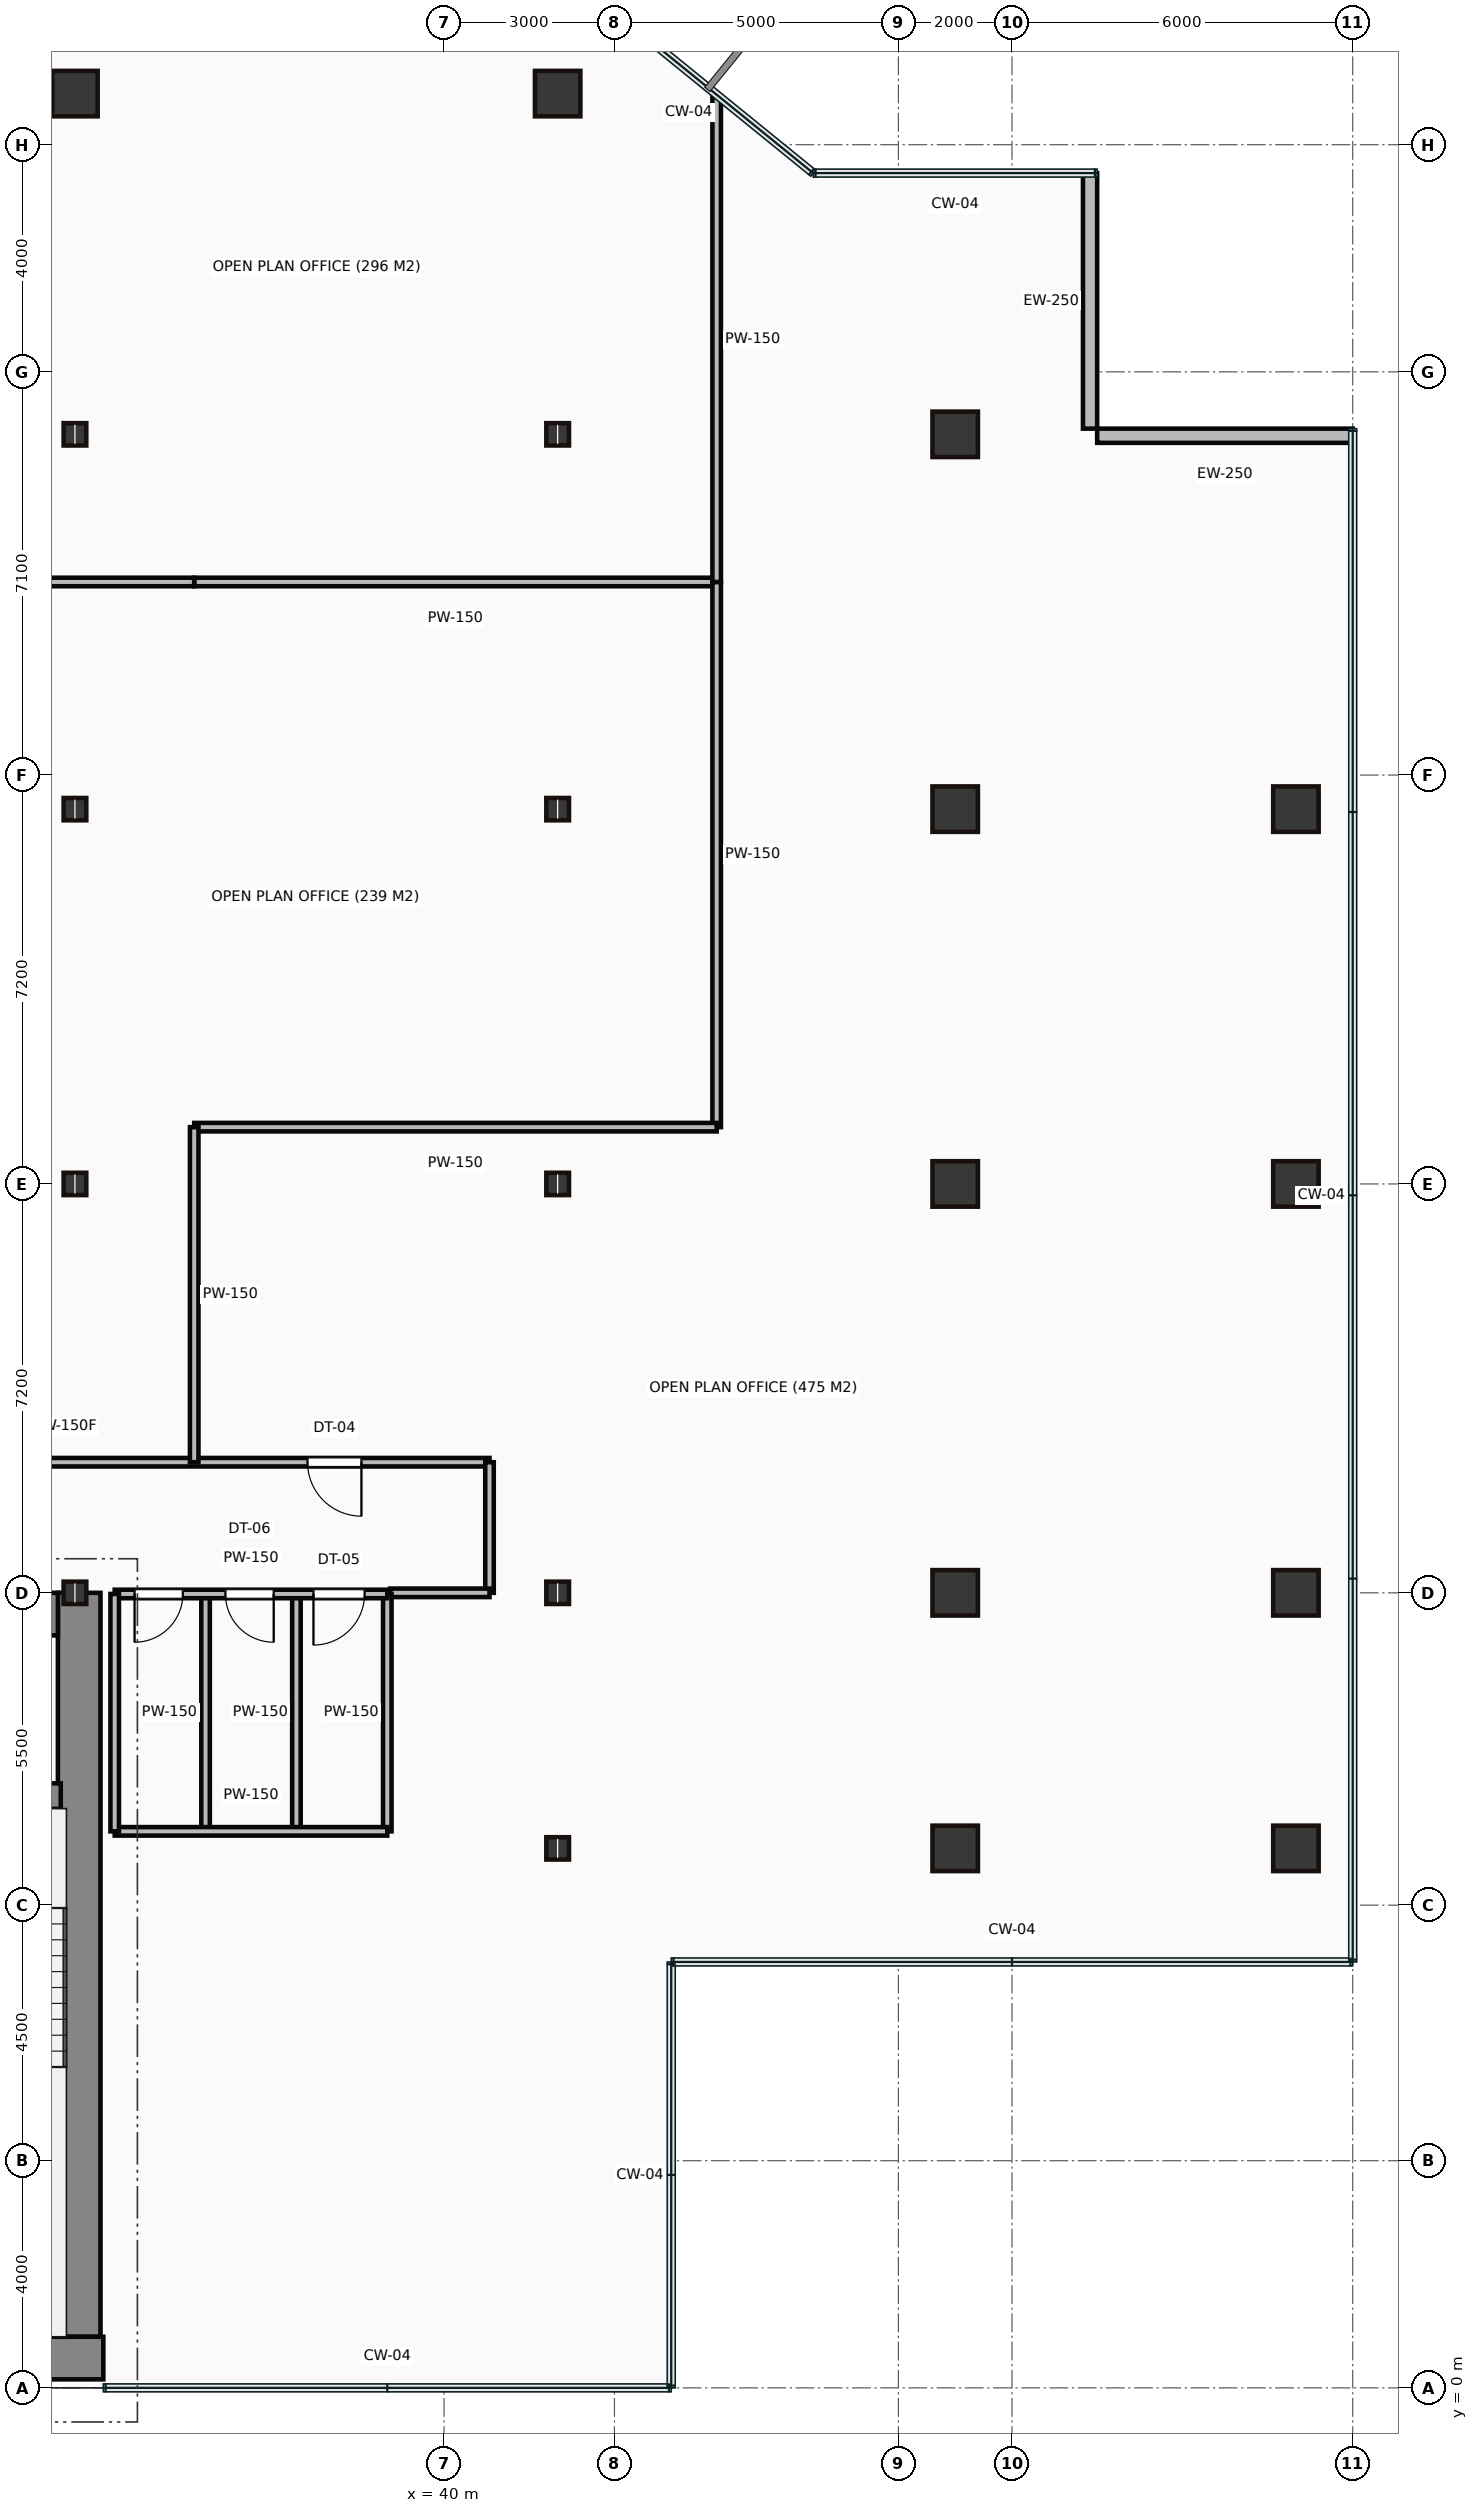
"""IFC4 building model, lengths in metres.
Left out: names, types, materials, properties, quantities, classifications, styles, units other than length and angle.
Written with IfcOpenShell. Run it as: python <this file> out.ifc"""

import sys

from ifc_helpers import new_model, si_unit, direction, frame, frame_2d, origin, origin_2d, place, context, subcontext, project, spatial, rectangle, hollow_rectangle, i_section, extrude, source, transform, mapped, element, fill, save


model = new_model("IFC4")
c1 = context("Model", 3, precision=1e-05, world=origin(), true_north=direction((0.0, 1.0)))
c2 = subcontext(c1, "Body", "Model", "MODEL_VIEW")
j1 = project(units=[si_unit("LENGTHUNIT", "METRE"), si_unit("PLANEANGLEUNIT", "RADIAN")], contexts=[c1])
p1 = place(None, origin())
s1 = spatial("IfcSite", under=j1, at=p1, CompositionType="ELEMENT")
p2 = place(p1, origin())
s2 = spatial("IfcBuilding", under=s1, at=p2, CompositionType="ELEMENT")
p3 = place(p2, frame((0.0, 0.0, 95.95)))
s3 = spatial("IfcBuildingStorey", under=s2, at=p3, CompositionType="ELEMENT", Elevation=95.95)
m1 = source(origin(), c2, "Body", "SweptSolid", [
    extrude(rectangle(XDim=29.5, YDim=0.75, at=frame_2d((14.75, 0.0))), origin(), (0.0, 0.0, 1.0), 3.65),
])
p4 = place(p3, frame((4.5, 0.525, 0.0), z_axis=(0.0, 0.0, 1.0), x_axis=(1.0, 0.0, 0.0)))
e1 = element("IfcWall", 1, at=p4, inside=s3, PredefinedType="SHEAR", context=c2, shape_type="MappedRepresentation", body=[
    mapped(m1, transform((0.0, 0.0, 0.0))),
])
m2 = source(origin(), c2, "Body", "SweptSolid", [
    extrude(rectangle(XDim=13.1, YDim=0.75, at=frame_2d((6.55, 0.0))), origin(), (0.0, 0.0, 1.0), 3.65),
])
p5 = place(p3, frame((33.575, 0.9, 0.0), z_axis=(0.0, 0.0, 1.0), x_axis=(0.0, 1.0, 0.0)))
e2 = element("IfcWall", 2, at=p5, inside=s3, PredefinedType="SHEAR", context=c2, shape_type="MappedRepresentation", body=[
    mapped(m2, transform((0.0, 0.0, 0.0))),
])
m3 = source(origin(), c2, "Body", "SweptSolid", [
    extrude(rectangle(XDim=12.6, YDim=0.75, at=frame_2d((6.3, 0.0))), origin(), (0.0, 0.0, 1.0), 3.65),
])
p6 = place(p3, frame((20.6, 13.625, 0.0), z_axis=(0.0, 0.0, 1.0), x_axis=(1.0, 0.0, 0.0)))
e3 = element("IfcWall", 3, at=p6, inside=s3, PredefinedType="SHEAR", context=c2, shape_type="MappedRepresentation", body=[
    mapped(m3, transform((0.0, 0.0, 0.0))),
])
p7 = place(p6, frame((9.25, 0.0, 0.0)))
e4 = element("IfcOpeningElement", 4, at=p7, cuts=e3, PredefinedType="OPENING", context=c2, shape_type="SweptSolid", body=[
    extrude(rectangle(XDim=1.1, YDim=2.15, at=frame_2d((0.55, 1.075))), frame((0.0, 0.385, 0.0), z_axis=(0.0, -1.0, 0.0), x_axis=(1.0, 0.0, 0.0)), (0.0, 0.0, 1.0), 0.77),
])
m4 = source(origin(), c2, "Body", "SweptSolid", [
    extrude(rectangle(XDim=3.39, YDim=0.45, at=frame_2d((1.695, 0.0))), origin(), (0.0, 0.0, 1.0), 3.65),
])
p8 = place(p3, frame((29.86, 10.42, 0.0), z_axis=(0.0, 0.0, 1.0), x_axis=(1.0, 0.0, 0.0)))
e5 = element("IfcWall", 5, at=p8, inside=s3, PredefinedType="SHEAR", context=c2, shape_type="MappedRepresentation", body=[
    mapped(m4, transform((0.0, 0.0, 0.0))),
])
p9 = place(p8, frame((1.1, 0.0, 0.0)))
e6 = element("IfcOpeningElement", 6, at=p9, cuts=e5, PredefinedType="OPENING", context=c2, shape_type="SweptSolid", body=[
    extrude(rectangle(XDim=1.1, YDim=2.15, at=frame_2d((0.55, 1.075))), frame((0.0, 0.235, 0.0), z_axis=(0.0, -1.0, 0.0), x_axis=(1.0, 0.0, 0.0)), (0.0, 0.0, 1.0), 0.47),
])
m5 = source(origin(), c2, "Body", "SweptSolid", [
    extrude(i_section(OverallWidth=0.399, OverallDepth=0.393, WebThickness=0.023, FlangeThickness=0.037, at=origin_2d()), origin(), (0.0, 0.0, 1.0), 3.65),
])
for number, where, z_axis, x_axis in (
    (7, (33.5, 14.0, 0.0), (0.0, 0.0, 1.0), (1.0, 0.0, 0.0)),
    (8, (33.5, 21.2, 0.0), (0.0, 0.0, 1.0), (1.0, 0.0, 0.0)),
    (9, (33.5, 27.8, 0.0), (0.0, 0.0, 1.0), (1.0, 0.0, 0.0)),
    (10, (33.5, 34.4, 0.0), (0.0, 0.0, 1.0), (1.0, 0.0, 0.0)),
):
    element("IfcColumn", number, at=place(p3, frame(where, z_axis=z_axis, x_axis=x_axis)), inside=s3, PredefinedType="COLUMN", context=c2, shape_type="MappedRepresentation", body=[
        mapped(m5, transform((0.0, 0.0, 0.0))),
    ])
m6 = source(origin(), c2, "Body", "SweptSolid", [
    extrude(hollow_rectangle(XDim=0.8, YDim=0.8, WallThickness=0.04, at=origin_2d()), origin(), (0.0, 0.0, 1.0), 3.65),
])
p10 = place(p3, frame((33.5, 40.4, 0.0), z_axis=(0.0, 0.0, 1.0), x_axis=(1.0, 0.0, 0.0)))
e11 = element("IfcColumn", 11, at=p10, inside=s3, PredefinedType="COLUMN", context=c2, shape_type="MappedRepresentation", body=[
    mapped(m6, transform((0.0, 0.0, 0.0))),
])
for number, where, z_axis, x_axis in (
    (12, (42.0, 9.5, 0.0), (0.0, 0.0, 1.0), (1.0, 0.0, 0.0)),
    (13, (42.0, 14.0, 0.0), (0.0, 0.0, 1.0), (1.0, 0.0, 0.0)),
    (14, (42.0, 21.2, 0.0), (0.0, 0.0, 1.0), (1.0, 0.0, 0.0)),
    (15, (42.0, 27.8, 0.0), (0.0, 0.0, 1.0), (1.0, 0.0, 0.0)),
    (16, (42.0, 34.4, 0.0), (0.0, 0.0, 1.0), (1.0, 0.0, 0.0)),
):
    element("IfcColumn", number, at=place(p3, frame(where, z_axis=z_axis, x_axis=x_axis)), inside=s3, PredefinedType="COLUMN", context=c2, shape_type="MappedRepresentation", body=[
        mapped(m5, transform((0.0, 0.0, 0.0))),
    ])
for number, where, z_axis, x_axis in (
    (17, (42.0, 40.4, 0.0), (0.0, 0.0, 1.0), (1.0, 0.0, 0.0)),
    (18, (49.0, 9.5, 0.0), (0.0, 0.0, 1.0), (1.0, 0.0, 0.0)),
    (19, (49.0, 14.0, 0.0), (0.0, 0.0, 1.0), (1.0, 0.0, 0.0)),
    (20, (49.0, 21.2, 0.0), (0.0, 0.0, 1.0), (1.0, 0.0, 0.0)),
    (21, (49.0, 27.8, 0.0), (0.0, 0.0, 1.0), (1.0, 0.0, 0.0)),
    (22, (49.0, 34.4, 0.0), (0.0, 0.0, 1.0), (1.0, 0.0, 0.0)),
    (23, (55.0, 9.5, 0.0), (0.0, 0.0, 1.0), (1.0, 0.0, 0.0)),
    (24, (55.0, 14.0, 0.0), (0.0, 0.0, 1.0), (1.0, 0.0, 0.0)),
    (25, (55.0, 21.2, 0.0), (0.0, 0.0, 1.0), (1.0, 0.0, 0.0)),
    (26, (55.0, 27.8, 0.0), (0.0, 0.0, 1.0), (1.0, 0.0, 0.0)),
):
    element("IfcColumn", number, at=place(p3, frame(where, z_axis=z_axis, x_axis=x_axis)), inside=s3, PredefinedType="COLUMN", context=c2, shape_type="MappedRepresentation", body=[
        mapped(m6, transform((0.0, 0.0, 0.0))),
    ])
m7 = source(origin(), c2, "Body", "SweptSolid", [
    extrude(rectangle(XDim=4.5, YDim=0.25, at=frame_2d((2.25, 0.0))), origin(), (0.0, 0.0, 1.0), 3.4),
])
for number, where, z_axis, x_axis in (
    (27, (56.0, 34.375, 0.0), (0.0, 0.0, 1.0), (-1.0, 0.0, 0.0)),
    (28, (51.375, 34.5, 0.0), (0.0, 0.0, 1.0), (0.0, 1.0, 0.0)),
):
    element("IfcWall", number, at=place(p3, frame(where, z_axis=z_axis, x_axis=x_axis)), inside=s3, PredefinedType="STANDARD", context=c2, shape_type="MappedRepresentation", body=[
        mapped(m7, transform((0.0, 0.0, 0.0))),
    ])
m8 = source(origin(), c2, "Body", "SweptSolid", [
    extrude(rectangle(XDim=4.8, YDim=0.15, at=frame_2d((2.4, 0.0))), origin(), (0.0, 0.0, 1.0), 2.702),
])
p11 = place(p3, frame((34.2, 13.98, 0.0), z_axis=(0.0, 0.0, 1.0), x_axis=(1.0, 0.0, 0.0)))
e29 = element("IfcWall", 29, at=p11, inside=s3, PredefinedType="PARTITIONING", context=c2, shape_type="MappedRepresentation", body=[
    mapped(m8, transform((0.0, 0.0, 0.0))),
])
p12 = place(p11, frame((0.35, 0.0, 0.0)))
e30 = element("IfcOpeningElement", 30, at=p12, cuts=e29, PredefinedType="OPENING", context=c2, shape_type="SweptSolid", body=[
    extrude(rectangle(XDim=0.85, YDim=2.1, at=frame_2d((0.425, 1.05))), frame((0.0, 0.085, 0.0), z_axis=(0.0, -1.0, 0.0), x_axis=(1.0, 0.0, 0.0)), (0.0, 0.0, 1.0), 0.17),
])
p13 = place(p11, frame((1.95, 0.0, 0.0)))
e31 = element("IfcOpeningElement", 31, at=p13, cuts=e29, PredefinedType="OPENING", context=c2, shape_type="SweptSolid", body=[
    extrude(rectangle(XDim=0.85, YDim=2.1, at=frame_2d((0.425, 1.05))), frame((0.0, 0.085, 0.0), z_axis=(0.0, -1.0, 0.0), x_axis=(1.0, 0.0, 0.0)), (0.0, 0.0, 1.0), 0.17),
])
p14 = place(p11, frame((3.5, 0.0, 0.0)))
e32 = element("IfcOpeningElement", 32, at=p14, cuts=e29, PredefinedType="OPENING", context=c2, shape_type="SweptSolid", body=[
    extrude(rectangle(XDim=0.9, YDim=2.1, at=frame_2d((0.45, 1.05))), frame((0.0, 0.085, 0.0), z_axis=(0.0, -1.0, 0.0), x_axis=(1.0, 0.0, 0.0)), (0.0, 0.0, 1.0), 0.17),
])
m9 = source(origin(), c2, "Body", "SweptSolid", [
    extrude(rectangle(XDim=4.8, YDim=0.15, at=frame_2d((2.4, 0.0))), origin(), (0.0, 0.0, 1.0), 3.4),
])
p15 = place(p3, frame((34.2, 9.8, 0.0), z_axis=(0.0, 0.0, 1.0), x_axis=(1.0, 0.0, 0.0)))
e33 = element("IfcWall", 33, at=p15, inside=s3, PredefinedType="PARTITIONING", context=c2, shape_type="MappedRepresentation", body=[
    mapped(m9, transform((0.0, 0.0, 0.0))),
])
m10 = source(origin(), c2, "Body", "SweptSolid", [
    extrude(rectangle(XDim=4.18, YDim=0.15, at=frame_2d((2.09, 0.0))), origin(), (0.0, 0.0, 1.0), 3.4),
])
for number, where, z_axis, x_axis in (
    (34, (39.0, 9.8, 0.0), (0.0, 0.0, 1.0), (0.0, 1.0, 0.0)),
    (35, (34.2, 9.8, 0.0), (0.0, 0.0, 1.0), (0.0, 1.0, 0.0)),
    (36, (35.8, 9.8, 0.0), (0.0, 0.0, 1.0), (0.0, 1.0, 0.0)),
    (37, (37.4, 9.8, 0.0), (0.0, 0.0, 1.0), (0.0, 1.0, 0.0)),
):
    element("IfcWall", number, at=place(p3, frame(where, z_axis=z_axis, x_axis=x_axis)), inside=s3, PredefinedType="PARTITIONING", context=c2, shape_type="MappedRepresentation", body=[
        mapped(m10, transform((0.0, 0.0, 0.0))),
    ])
m11 = source(origin(), c2, "Body", "SweptSolid", [
    extrude(rectangle(XDim=14.95, YDim=0.15, at=frame_2d((7.475, 0.0))), origin(), (0.0, 0.0, 1.0), 3.4),
])
p16 = place(p3, frame((25.85, 16.3, 0.0), z_axis=(0.0, 0.0, 1.0), x_axis=(1.0, 0.0, 0.0)))
e38 = element("IfcWall", 38, at=p16, inside=s3, PredefinedType="PARTITIONING", context=c2, shape_type="MappedRepresentation", body=[
    mapped(m11, transform((0.0, 0.0, 0.0))),
])
p17 = place(p16, frame((11.745, 0.0, 0.0)))
e39 = element("IfcOpeningElement", 39, at=p17, cuts=e38, PredefinedType="OPENING", context=c2, shape_type="SweptSolid", body=[
    extrude(rectangle(XDim=0.95, YDim=2.15, at=frame_2d((0.475, 1.075))), frame((0.0, 0.085, 0.0), z_axis=(0.0, -1.0, 0.0), x_axis=(1.0, 0.0, 0.0)), (0.0, 0.0, 1.0), 0.17),
])
m12 = source(origin(), c2, "Body", "SweptSolid", [
    extrude(rectangle(XDim=2.3, YDim=0.15, at=frame_2d((1.15, 0.0))), origin(), (0.0, 0.0, 1.0), 3.4),
])
p18 = place(p3, frame((40.8, 16.3, 0.0), z_axis=(0.0, 0.0, 1.0), x_axis=(0.0, -1.0, 0.0)))
e40 = element("IfcWall", 40, at=p18, inside=s3, PredefinedType="PARTITIONING", context=c2, shape_type="MappedRepresentation", body=[
    mapped(m12, transform((0.0, 0.0, 0.0))),
])
m13 = source(origin(), c2, "Body", "SweptSolid", [
    extrude(rectangle(XDim=1.75, YDim=0.15, at=frame_2d((0.875, 0.0))), origin(), (0.0, 0.0, 1.0), 2.702),
])
p19 = place(p3, frame((40.8, 14.0, 0.0), z_axis=(0.0, 0.0, 1.0), x_axis=(-1.0, 0.0, 0.0)))
e41 = element("IfcWall", 41, at=p19, inside=s3, PredefinedType="PARTITIONING", context=c2, shape_type="MappedRepresentation", body=[
    mapped(m13, transform((0.0, 0.0, 0.0))),
])
m14 = source(origin(), c2, "Body", "SweptSolid", [
    extrude(rectangle(XDim=9.2, YDim=0.15, at=frame_2d((4.6, 0.0))), origin(), (0.0, 0.0, 1.0), 3.4),
])
p20 = place(p3, frame((44.8, 31.8, 0.0), z_axis=(0.0, 0.0, 1.0), x_axis=(-1.0, 0.0, 0.0)))
e42 = element("IfcWall", 42, at=p20, inside=s3, PredefinedType="PARTITIONING", context=c2, shape_type="MappedRepresentation", body=[
    mapped(m14, transform((0.0, 0.0, 0.0))),
])
m15 = source(origin(), c2, "Body", "SweptSolid", [
    extrude(rectangle(XDim=9.2, YDim=0.15, at=frame_2d((4.6, 0.0))), origin(), (0.0, 0.0, 1.0), 3.4),
])
p21 = place(p3, frame((35.6, 31.8, 0.0), z_axis=(0.0, 0.0, 1.0), x_axis=(-1.0, 0.0, 0.0)))
e43 = element("IfcWall", 43, at=p21, inside=s3, PredefinedType="PARTITIONING", context=c2, shape_type="MappedRepresentation", body=[
    mapped(m15, transform((0.0, 0.0, 0.0))),
])
m16 = source(origin(), c2, "Body", "SweptSolid", [
    extrude(rectangle(XDim=9.6, YDim=0.15, at=frame_2d((4.8, 0.0))), origin(), (0.0, 0.0, 1.0), 3.4),
])
p22 = place(p3, frame((44.8, 31.8, 0.0), z_axis=(0.0, 0.0, 1.0), x_axis=(0.0, -1.0, 0.0)))
e44 = element("IfcWall", 44, at=p22, inside=s3, PredefinedType="PARTITIONING", context=c2, shape_type="MappedRepresentation", body=[
    mapped(m16, transform((0.0, 0.0, 0.0))),
])
p23 = place(p3, frame((44.8, 22.2, 0.0), z_axis=(0.0, 0.0, 1.0), x_axis=(-1.0, 0.0, 0.0)))
e45 = element("IfcWall", 45, at=p23, inside=s3, PredefinedType="PARTITIONING", context=c2, shape_type="MappedRepresentation", body=[
    mapped(m14, transform((0.0, 0.0, 0.0))),
])
m17 = source(origin(), c2, "Body", "SweptSolid", [
    extrude(rectangle(XDim=5.9, YDim=0.15, at=frame_2d((2.95, 0.0))), origin(), (0.0, 0.0, 1.0), 3.4),
])
p24 = place(p3, frame((35.6, 22.2, 0.0), z_axis=(0.0, 0.0, 1.0), x_axis=(0.0, -1.0, 0.0)))
e46 = element("IfcWall", 46, at=p24, inside=s3, PredefinedType="PARTITIONING", context=c2, shape_type="MappedRepresentation", body=[
    mapped(m17, transform((0.0, 0.0, 0.0))),
])
m18 = source(origin(), c2, "Body", "SweptSolid", [
    extrude(rectangle(XDim=8.555, YDim=0.15, at=frame_2d((4.277, 0.0))), origin(), (0.0, 0.0, 1.0), 3.4),
])
p25 = place(p3, frame((44.8, 40.355, 0.0), z_axis=(0.0, 0.0, 1.0), x_axis=(0.0, -1.0, 0.0)))
e47 = element("IfcWall", 47, at=p25, inside=s3, PredefinedType="PARTITIONING", context=c2, shape_type="MappedRepresentation", body=[
    mapped(m18, transform((0.0, 0.0, 0.0))),
])
m19 = source(origin(), c2, "Body", "SweptSolid", [
    extrude(rectangle(XDim=0.85, YDim=2.1, at=frame_2d((0.425, 1.05))), frame((0.0, 0.025, 0.0), z_axis=(0.0, -1.0, 0.0), x_axis=(1.0, 0.0, 0.0)), (0.0, 0.0, 1.0), 0.05),
])
p26 = place(p12, frame((0.85, 0.0, 0.0), z_axis=(0.0, 0.0, 1.0), x_axis=(-1.0, 0.0, 0.0)))
e48 = element("IfcDoor", 48, at=p26, inside=s3, OperationType="SINGLE_SWING_LEFT", PredefinedType="DOOR", context=c2, shape_type="MappedRepresentation", body=[
    mapped(m19, transform((0.0, 0.0, 0.0))),
])
fill(e30, e48)
p27 = place(p13, frame((0.85, 0.0, 0.0), z_axis=(0.0, 0.0, 1.0), x_axis=(-1.0, 0.0, 0.0)))
e49 = element("IfcDoor", 49, at=p27, inside=s3, OperationType="SINGLE_SWING_RIGHT", PredefinedType="DOOR", context=c2, shape_type="MappedRepresentation", body=[
    mapped(m19, transform((0.0, 0.0, 0.0))),
])
fill(e31, e49)
m20 = source(origin(), c2, "Body", "SweptSolid", [
    extrude(rectangle(XDim=0.9, YDim=2.1, at=frame_2d((0.45, 1.05))), frame((0.0, 0.025, 0.0), z_axis=(0.0, -1.0, 0.0), x_axis=(1.0, 0.0, 0.0)), (0.0, 0.0, 1.0), 0.05),
])
p28 = place(p14, frame((0.9, 0.0, 0.0), z_axis=(0.0, 0.0, 1.0), x_axis=(-1.0, 0.0, 0.0)))
e50 = element("IfcDoor", 50, at=p28, inside=s3, OperationType="SINGLE_SWING_LEFT", PredefinedType="DOOR", context=c2, shape_type="MappedRepresentation", body=[
    mapped(m20, transform((0.0, 0.0, 0.0))),
])
fill(e32, e50)
m21 = source(origin(), c2, "Body", "SweptSolid", [
    extrude(rectangle(XDim=0.95, YDim=2.15, at=frame_2d((0.475, 1.075))), frame((0.0, 0.025, 0.0), z_axis=(0.0, -1.0, 0.0), x_axis=(1.0, 0.0, 0.0)), (0.0, 0.0, 1.0), 0.05),
])
p29 = place(p17, origin())
e51 = element("IfcDoor", 51, at=p29, inside=s3, OperationType="SINGLE_SWING_RIGHT", PredefinedType="DOOR", context=c2, shape_type="MappedRepresentation", body=[
    mapped(m21, transform((0.0, 0.0, 0.0))),
])
fill(e39, e51)
save(model, sys.argv[1])
